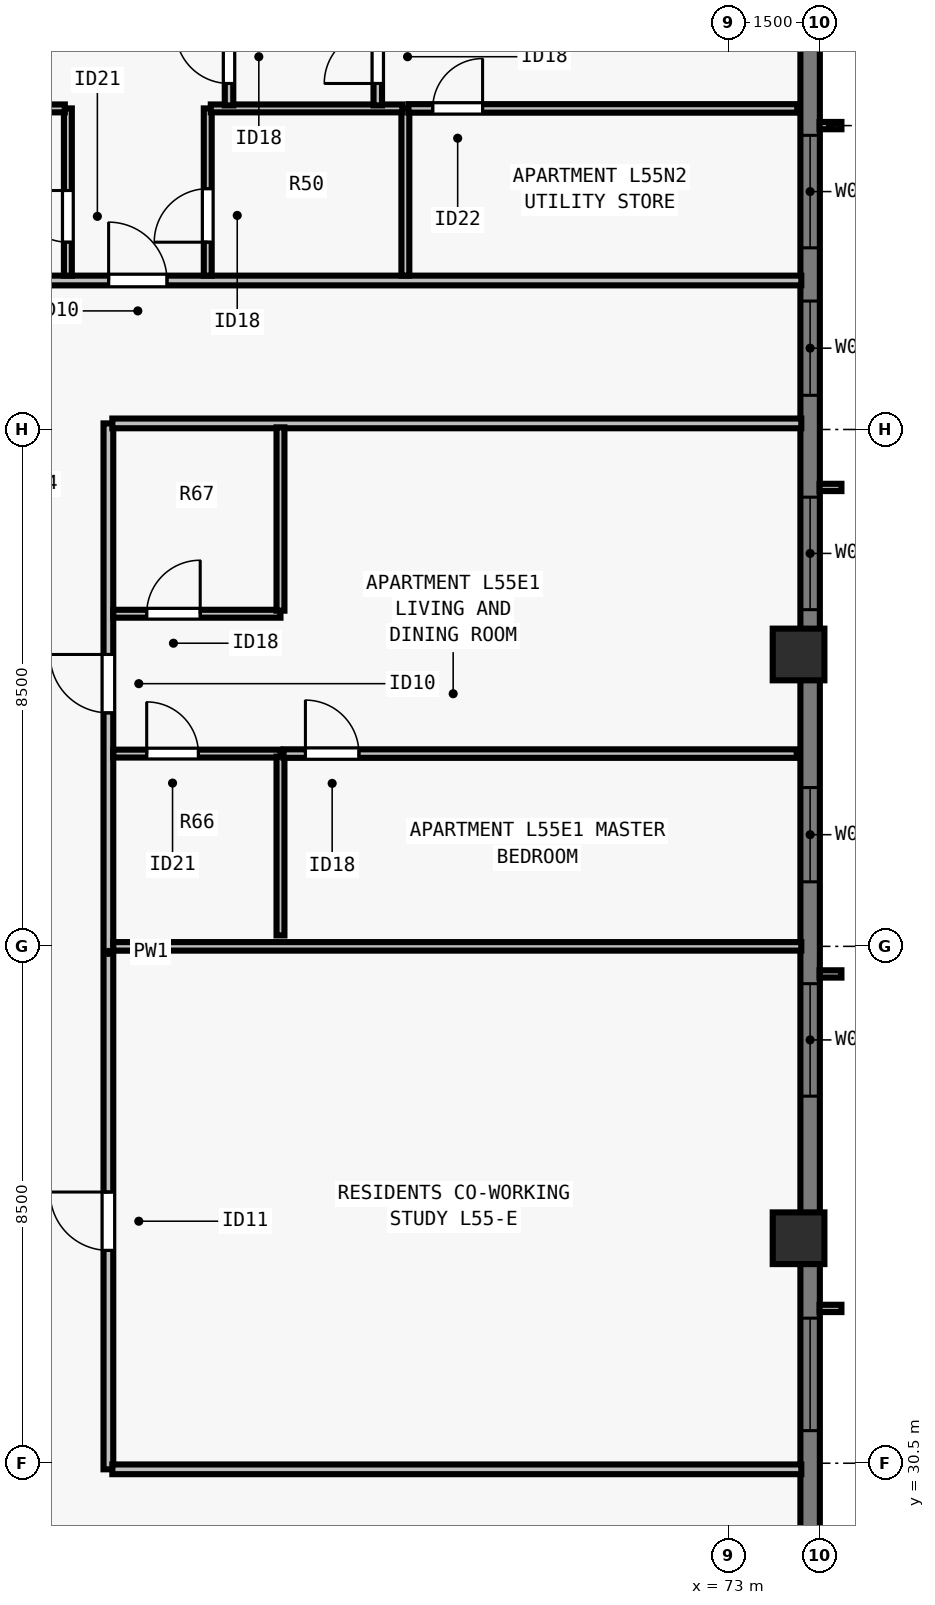
"""IFC4 building model, lengths in metres.
Left out: names, types, materials, properties, quantities, classifications, styles, units other than length and angle.
Written with IfcOpenShell. Run it as: python <this file> out.ifc"""

import sys

from ifc_helpers import new_model, si_unit, direction, frame, frame_2d, origin, origin_2d, place, context, subcontext, project, spatial, rectangle, extrude, element, fill, save


model = new_model("IFC4")
c1 = context("Model", 3, precision=1e-05, world=origin(), true_north=direction((0.0, 1.0)))
c2 = subcontext(c1, "Body", "Model", "MODEL_VIEW")
j1 = project(units=[si_unit("LENGTHUNIT", "METRE"), si_unit("PLANEANGLEUNIT", "RADIAN")], contexts=[c1])
p1 = place(None, origin())
s1 = spatial("IfcSite", under=j1, at=p1, CompositionType="ELEMENT")
p2 = place(p1, origin())
s2 = spatial("IfcBuilding", under=s1, at=p2, CompositionType="ELEMENT")
p3 = place(p2, frame((0.0, 0.0, 202.5)))
s3 = spatial("IfcBuildingStorey", under=s2, at=p3, CompositionType="ELEMENT", Elevation=202.5)
for number, where, z_axis, x_axis in (
    (1, (74.15, 34.2, 0.0), (0.0, 0.0, 1.0), (0.0, 1.0, 0.0)),
    (2, (74.15, 43.8, 0.0), (0.0, 0.0, 1.0), (0.0, 1.0, 0.0)),
):
    element("IfcColumn", number, at=place(p3, frame(where, z_axis=z_axis, x_axis=x_axis)), inside=s3, PredefinedType="COLUMN", context=c2, shape_type="SweptSolid", body=[
        extrude(rectangle(XDim=0.85, YDim=0.85, at=origin_2d()), origin(), (0.0, 0.0, 1.0), 3.5),
    ])
p4 = place(p3, frame((74.34, 56.5, 0.0), z_axis=(0.0, 0.0, 1.0), x_axis=(0.0, -1.0, 0.0)))
e3 = element("IfcWall", 3, at=p4, inside=s3, PredefinedType="SOLIDWALL", context=c2, shape_type="SweptSolid", body=[
    extrude(rectangle(XDim=34.702, YDim=0.32, at=frame_2d((17.351, 0.0))), origin(), (0.0, 0.0, 1.0), 3.29),
])
p5 = place(p4, frame((4.163, 0.0, 0.8)))
e4 = element("IfcOpeningElement", 4, at=p5, cuts=e3, PredefinedType="OPENING", context=c2, shape_type="SweptSolid", body=[
    extrude(rectangle(XDim=1.85, YDim=1.678, at=frame_2d((0.925, 0.839))), frame((0.0, 0.17, 0.0), z_axis=(0.0, -1.0, 0.0), x_axis=(1.0, 0.0, 0.0)), (0.0, 0.0, 1.0), 0.34),
])
p6 = place(p4, frame((6.888, 0.0, 0.8)))
e5 = element("IfcOpeningElement", 5, at=p6, cuts=e3, PredefinedType="OPENING", context=c2, shape_type="SweptSolid", body=[
    extrude(rectangle(XDim=1.55, YDim=1.678, at=frame_2d((0.775, 0.839))), frame((0.0, 0.17, 0.0), z_axis=(0.0, -1.0, 0.0), x_axis=(1.0, 0.0, 0.0)), (0.0, 0.0, 1.0), 0.34),
])
p7 = place(p4, frame((10.113, 0.0, 0.8)))
e6 = element("IfcOpeningElement", 6, at=p7, cuts=e3, PredefinedType="OPENING", context=c2, shape_type="SweptSolid", body=[
    extrude(rectangle(XDim=1.85, YDim=1.678, at=frame_2d((0.925, 0.839))), frame((0.0, 0.17, 0.0), z_axis=(0.0, -1.0, 0.0), x_axis=(1.0, 0.0, 0.0)), (0.0, 0.0, 1.0), 0.34),
])
p8 = place(p4, frame((14.888, 0.0, 0.8)))
e7 = element("IfcOpeningElement", 7, at=p8, cuts=e3, PredefinedType="OPENING", context=c2, shape_type="SweptSolid", body=[
    extrude(rectangle(XDim=1.55, YDim=1.678, at=frame_2d((0.775, 0.839))), frame((0.0, 0.17, 0.0), z_axis=(0.0, -1.0, 0.0), x_axis=(1.0, 0.0, 0.0)), (0.0, 0.0, 1.0), 0.34),
])
p9 = place(p4, frame((18.114, 0.0, 0.8)))
e8 = element("IfcOpeningElement", 8, at=p9, cuts=e3, PredefinedType="OPENING", context=c2, shape_type="SweptSolid", body=[
    extrude(rectangle(XDim=1.85, YDim=1.678, at=frame_2d((0.925, 0.839))), frame((0.0, 0.17, 0.0), z_axis=(0.0, -1.0, 0.0), x_axis=(1.0, 0.0, 0.0)), (0.0, 0.0, 1.0), 0.34),
])
p10 = place(p4, frame((23.614, 0.0, 0.8)))
e9 = element("IfcOpeningElement", 9, at=p10, cuts=e3, PredefinedType="OPENING", context=c2, shape_type="SweptSolid", body=[
    extrude(rectangle(XDim=1.85, YDim=1.678, at=frame_2d((0.925, 0.839))), frame((0.0, 0.17, 0.0), z_axis=(0.0, -1.0, 0.0), x_axis=(1.0, 0.0, 0.0)), (0.0, 0.0, 1.0), 0.34),
])
p11 = place(p4, frame((28.839, 0.0, 0.8)))
e10 = element("IfcOpeningElement", 10, at=p11, cuts=e3, PredefinedType="OPENING", context=c2, shape_type="SweptSolid", body=[
    extrude(rectangle(XDim=1.55, YDim=1.678, at=frame_2d((0.775, 0.839))), frame((0.0, 0.17, 0.0), z_axis=(0.0, -1.0, 0.0), x_axis=(1.0, 0.0, 0.0)), (0.0, 0.0, 1.0), 0.34),
])
p12 = place(p3, frame((29.805, 49.95, 0.0), z_axis=(0.0, 0.0, 1.0), x_axis=(1.0, 0.0, 0.0)))
e11 = element("IfcWall", 11, at=p12, inside=s3, PredefinedType="PARTITIONING", context=c2, shape_type="SweptSolid", body=[
    extrude(rectangle(XDim=44.39, YDim=0.16, at=frame_2d((22.195, 0.0))), origin(), (0.0, 0.0, 1.0), 2.958),
])
p13 = place(p12, frame((10.919, 0.0, 0.0)))
e12 = element("IfcOpeningElement", 12, at=p13, cuts=e11, PredefinedType="OPENING", context=c2, shape_type="SweptSolid", body=[
    extrude(rectangle(XDim=0.96, YDim=2.18, at=frame_2d((0.48, 1.09))), frame((0.0, 0.09, 0.0), z_axis=(0.0, -1.0, 0.0), x_axis=(1.0, 0.0, 0.0)), (0.0, 0.0, 1.0), 0.18),
])
p14 = place(p12, frame((32.999, 0.0, 0.0)))
e13 = element("IfcOpeningElement", 13, at=p14, cuts=e11, PredefinedType="OPENING", context=c2, shape_type="SweptSolid", body=[
    extrude(rectangle(XDim=0.96, YDim=2.18, at=frame_2d((0.48, 1.09))), frame((0.0, 0.09, 0.0), z_axis=(0.0, -1.0, 0.0), x_axis=(1.0, 0.0, 0.0)), (0.0, 0.0, 1.0), 0.18),
])
p15 = place(p3, frame((62.8, 30.4, 0.0), z_axis=(0.0, 0.0, 1.0), x_axis=(0.0, 1.0, 0.0)))
e14 = element("IfcWall", 14, at=p15, inside=s3, PredefinedType="PARTITIONING", context=c2, shape_type="SweptSolid", body=[
    extrude(rectangle(XDim=17.2, YDim=0.16, at=frame_2d((8.6, 0.0))), origin(), (0.0, 0.0, 1.0), 3.29),
])
p16 = place(p15, frame((3.6, 0.0, 0.0)))
e15 = element("IfcOpeningElement", 15, at=p16, cuts=e14, PredefinedType="OPENING", context=c2, shape_type="SweptSolid", body=[
    extrude(rectangle(XDim=0.96, YDim=2.12, at=frame_2d((0.48, 1.06))), frame((0.0, 0.09, 0.0), z_axis=(0.0, -1.0, 0.0), x_axis=(1.0, 0.0, 0.0)), (0.0, 0.0, 1.0), 0.18),
])
p17 = place(p15, frame((12.44, 0.0, 0.0)))
e16 = element("IfcOpeningElement", 16, at=p17, cuts=e14, PredefinedType="OPENING", context=c2, shape_type="SweptSolid", body=[
    extrude(rectangle(XDim=0.96, YDim=2.18, at=frame_2d((0.48, 1.09))), frame((0.0, 0.09, 0.0), z_axis=(0.0, -1.0, 0.0), x_axis=(1.0, 0.0, 0.0)), (0.0, 0.0, 1.0), 0.18),
])
for number, where, z_axis, x_axis in (
    (17, (62.865, 30.4, 0.0), (0.0, 0.0, 1.0), (1.0, 0.0, 0.0)),
    (18, (62.865, 47.6, 0.0), (0.0, 0.0, 1.0), (1.0, 0.0, 0.0)),
):
    element("IfcWall", number, at=place(p3, frame(where, z_axis=z_axis, x_axis=x_axis)), inside=s3, PredefinedType="PARTITIONING", context=c2, shape_type="SweptSolid", body=[
        extrude(rectangle(XDim=11.33, YDim=0.16, at=frame_2d((5.665, 0.0))), origin(), (0.0, 0.0, 1.0), 3.29),
    ])
p18 = place(p3, frame((62.134, 50.03, 0.0), z_axis=(0.0, 0.0, 1.0), x_axis=(0.0, 1.0, 0.0)))
e19 = element("IfcWall", 19, at=p18, inside=s3, PredefinedType="PLUMBINGWALL", context=c2, shape_type="SweptSolid", body=[
    extrude(rectangle(XDim=2.75, YDim=0.13, at=frame_2d((1.375, 0.0))), origin(), (0.0, 0.0, 1.0), 2.573),
])
p19 = place(p18, frame((0.55, 0.0, 0.0)))
e20 = element("IfcOpeningElement", 20, at=p19, cuts=e19, PredefinedType="OPENING", context=c2, shape_type="SweptSolid", body=[
    extrude(rectangle(XDim=0.85, YDim=2.08, at=frame_2d((0.425, 1.04))), frame((0.0, 0.075, 0.0), z_axis=(0.0, -1.0, 0.0), x_axis=(1.0, 0.0, 0.0)), (0.0, 0.0, 1.0), 0.15),
])
p20 = place(p3, frame((59.234, 52.78, 0.0), z_axis=(0.0, 0.0, 1.0), x_axis=(1.0, 0.0, 0.0)))
e21 = element("IfcWall", 21, at=p20, inside=s3, PredefinedType="PLUMBINGWALL", context=c2, shape_type="SweptSolid", body=[
    extrude(rectangle(XDim=2.85, YDim=0.13, at=frame_2d((1.425, 0.0))), origin(), (0.0, 0.0, 1.0), 3.29),
])
p21 = place(p3, frame((67.684, 50.03, 0.0), z_axis=(0.0, 0.0, 1.0), x_axis=(0.0, 1.0, 0.0)))
e22 = element("IfcWall", 22, at=p21, inside=s3, PredefinedType="PLUMBINGWALL", context=c2, shape_type="SweptSolid", body=[
    extrude(rectangle(XDim=2.75, YDim=0.13, at=frame_2d((1.375, 0.0))), origin(), (0.0, 0.0, 1.0), 3.29),
])
p22 = place(p3, frame((64.434, 50.03, 0.0), z_axis=(0.0, 0.0, 1.0), x_axis=(0.0, 1.0, 0.0)))
e23 = element("IfcWall", 23, at=p22, inside=s3, PredefinedType="PLUMBINGWALL", context=c2, shape_type="SweptSolid", body=[
    extrude(rectangle(XDim=2.75, YDim=0.13, at=frame_2d((1.375, 0.0))), origin(), (0.0, 0.0, 1.0), 3.29),
])
p23 = place(p22, frame((0.55, 0.0, 0.0)))
e24 = element("IfcOpeningElement", 24, at=p23, cuts=e23, PredefinedType="OPENING", context=c2, shape_type="SweptSolid", body=[
    extrude(rectangle(XDim=0.88, YDim=2.1, at=frame_2d((0.44, 1.05))), frame((0.0, 0.075, 0.0), z_axis=(0.0, -1.0, 0.0), x_axis=(1.0, 0.0, 0.0)), (0.0, 0.0, 1.0), 0.15),
])
p24 = place(p3, frame((64.484, 52.78, 0.0), z_axis=(0.0, 0.0, 1.0), x_axis=(1.0, 0.0, 0.0)))
e25 = element("IfcWall", 25, at=p24, inside=s3, PredefinedType="PLUMBINGWALL", context=c2, shape_type="SweptSolid", body=[
    extrude(rectangle(XDim=3.15, YDim=0.13, at=frame_2d((1.575, 0.0))), origin(), (0.0, 0.0, 1.0), 3.29),
])
p25 = place(p3, frame((67.23, 52.83, 0.0), z_axis=(0.0, 0.0, 1.0), x_axis=(0.0, 1.0, 0.0)))
e26 = element("IfcWall", 26, at=p25, inside=s3, PredefinedType="PARTITIONING", context=c2, shape_type="SweptSolid", body=[
    extrude(rectangle(XDim=8.29, YDim=0.14, at=frame_2d((4.145, 0.0))), origin(), (0.0, 0.0, 1.0), 2.573),
])
p26 = place(p25, frame((0.36, 0.0, 0.0)))
e27 = element("IfcOpeningElement", 27, at=p26, cuts=e26, PredefinedType="OPENING", context=c2, shape_type="SweptSolid", body=[
    extrude(rectangle(XDim=0.88, YDim=2.1, at=frame_2d((0.44, 1.05))), frame((0.0, 0.08, 0.0), z_axis=(0.0, -1.0, 0.0), x_axis=(1.0, 0.0, 0.0)), (0.0, 0.0, 1.0), 0.16),
])
p27 = place(p3, frame((67.734, 52.78, 0.0), z_axis=(0.0, 0.0, 1.0), x_axis=(1.0, 0.0, 0.0)))
e28 = element("IfcWall", 28, at=p27, inside=s3, PredefinedType="PARTITIONING", context=c2, shape_type="SweptSolid", body=[
    extrude(rectangle(XDim=6.396, YDim=0.14, at=frame_2d((3.198, 0.0))), origin(), (0.0, 0.0, 1.0), 2.958),
])
p28 = place(p27, frame((0.4, 0.0, 0.0)))
e29 = element("IfcOpeningElement", 29, at=p28, cuts=e28, PredefinedType="OPENING", context=c2, shape_type="SweptSolid", body=[
    extrude(rectangle(XDim=0.82, YDim=2.1, at=frame_2d((0.41, 1.05))), frame((0.0, 0.08, 0.0), z_axis=(0.0, -1.0, 0.0), x_axis=(1.0, 0.0, 0.0)), (0.0, 0.0, 1.0), 0.16),
])
p29 = place(p3, frame((64.784, 52.83, 0.0), z_axis=(0.0, 0.0, 1.0), x_axis=(0.0, 1.0, 0.0)))
e30 = element("IfcWall", 30, at=p29, inside=s3, PredefinedType="PARTITIONING", context=c2, shape_type="SweptSolid", body=[
    extrude(rectangle(XDim=8.29, YDim=0.14, at=frame_2d((4.145, 0.0))), origin(), (0.0, 0.0, 1.0), 2.573),
])
p30 = place(p29, frame((0.36, 0.0, 0.0)))
e31 = element("IfcOpeningElement", 31, at=p30, cuts=e30, PredefinedType="OPENING", context=c2, shape_type="SweptSolid", body=[
    extrude(rectangle(XDim=0.88, YDim=2.1, at=frame_2d((0.44, 1.05))), frame((0.0, 0.08, 0.0), z_axis=(0.0, -1.0, 0.0), x_axis=(1.0, 0.0, 0.0)), (0.0, 0.0, 1.0), 0.16),
])
p31 = place(p3, frame((62.88, 39.0, 0.0), z_axis=(0.0, 0.0, 1.0), x_axis=(1.0, 0.0, 0.0)))
e32 = element("IfcWall", 32, at=p31, inside=s3, PredefinedType="PARTITIONING", context=c2, shape_type="SweptSolid", body=[
    extrude(rectangle(XDim=11.315, YDim=0.14, at=frame_2d((5.658, 0.0))), origin(), (0.0, 0.0, 1.0), 3.29),
])
p32 = place(p3, frame((62.88, 42.17, 0.0), z_axis=(0.0, 0.0, 1.0), x_axis=(1.0, 0.0, 0.0)))
e33 = element("IfcWall", 33, at=p32, inside=s3, PredefinedType="PLUMBINGWALL", context=c2, shape_type="SweptSolid", body=[
    extrude(rectangle(XDim=2.75, YDim=0.13, at=frame_2d((1.375, 0.0))), origin(), (0.0, 0.0, 1.0), 3.29),
])
p33 = place(p32, frame((0.55, 0.0, 0.0)))
e34 = element("IfcOpeningElement", 34, at=p33, cuts=e33, PredefinedType="OPENING", context=c2, shape_type="SweptSolid", body=[
    extrude(rectangle(XDim=0.85, YDim=2.08, at=frame_2d((0.425, 1.04))), frame((0.0, 0.075, 0.0), z_axis=(0.0, -1.0, 0.0), x_axis=(1.0, 0.0, 0.0)), (0.0, 0.0, 1.0), 0.15),
])
p34 = place(p3, frame((65.63, 39.18, 0.0), z_axis=(0.0, 0.0, 1.0), x_axis=(0.0, 1.0, 0.0)))
e35 = element("IfcWall", 35, at=p34, inside=s3, PredefinedType="PLUMBINGWALL", context=c2, shape_type="SweptSolid", body=[
    extrude(rectangle(XDim=2.94, YDim=0.13, at=frame_2d((1.47, 0.0))), origin(), (0.0, 0.0, 1.0), 3.29),
])
p35 = place(p3, frame((62.88, 44.47, 0.0), z_axis=(0.0, 0.0, 1.0), x_axis=(1.0, 0.0, 0.0)))
e36 = element("IfcWall", 36, at=p35, inside=s3, PredefinedType="PLUMBINGWALL", context=c2, shape_type="SweptSolid", body=[
    extrude(rectangle(XDim=2.75, YDim=0.13, at=frame_2d((1.375, 0.0))), origin(), (0.0, 0.0, 1.0), 3.29),
])
p36 = place(p35, frame((0.55, 0.0, 0.0)))
e37 = element("IfcOpeningElement", 37, at=p36, cuts=e36, PredefinedType="OPENING", context=c2, shape_type="SweptSolid", body=[
    extrude(rectangle(XDim=0.88, YDim=2.1, at=frame_2d((0.44, 1.05))), frame((0.0, 0.075, 0.0), z_axis=(0.0, -1.0, 0.0), x_axis=(1.0, 0.0, 0.0)), (0.0, 0.0, 1.0), 0.15),
])
p37 = place(p3, frame((65.63, 44.52, 0.0), z_axis=(0.0, 0.0, 1.0), x_axis=(0.0, 1.0, 0.0)))
e38 = element("IfcWall", 38, at=p37, inside=s3, PredefinedType="PLUMBINGWALL", context=c2, shape_type="SweptSolid", body=[
    extrude(rectangle(XDim=3.015, YDim=0.13, at=frame_2d((1.507, 0.0))), origin(), (0.0, 0.0, 1.0), 3.29),
])
p38 = place(p3, frame((65.68, 42.17, 0.0), z_axis=(0.0, 0.0, 1.0), x_axis=(1.0, 0.0, 0.0)))
e39 = element("IfcWall", 39, at=p38, inside=s3, PredefinedType="PARTITIONING", context=c2, shape_type="SweptSolid", body=[
    extrude(rectangle(XDim=8.44, YDim=0.14, at=frame_2d((4.22, 0.0))), origin(), (0.0, 0.0, 1.0), 3.29),
])
p39 = place(p38, frame((0.36, 0.0, 0.0)))
e40 = element("IfcOpeningElement", 40, at=p39, cuts=e39, PredefinedType="OPENING", context=c2, shape_type="SweptSolid", body=[
    extrude(rectangle(XDim=0.88, YDim=2.1, at=frame_2d((0.44, 1.05))), frame((0.0, 0.08, 0.0), z_axis=(0.0, -1.0, 0.0), x_axis=(1.0, 0.0, 0.0)), (0.0, 0.0, 1.0), 0.16),
])
p40 = place(p5, origin())
e41 = element("IfcWindow", 41, at=p40, inside=s3, PartitioningType="SINGLE_PANEL", PredefinedType="WINDOW", context=c2, shape_type="SweptSolid", body=[
    extrude(rectangle(XDim=1.85, YDim=1.678, at=frame_2d((0.925, 0.839))), frame((0.0, -0.05, 0.0), z_axis=(0.0, -1.0, 0.0), x_axis=(1.0, 0.0, 0.0)), (0.0, 0.0, 1.0), 0.06),
])
fill(e4, e41)
p41 = place(p6, origin())
e42 = element("IfcWindow", 42, at=p41, inside=s3, PartitioningType="SINGLE_PANEL", PredefinedType="WINDOW", context=c2, shape_type="SweptSolid", body=[
    extrude(rectangle(XDim=1.55, YDim=1.678, at=frame_2d((0.775, 0.839))), frame((0.0, -0.05, 0.0), z_axis=(0.0, -1.0, 0.0), x_axis=(1.0, 0.0, 0.0)), (0.0, 0.0, 1.0), 0.06),
])
fill(e5, e42)
p42 = place(p7, origin())
e43 = element("IfcWindow", 43, at=p42, inside=s3, PartitioningType="SINGLE_PANEL", PredefinedType="WINDOW", context=c2, shape_type="SweptSolid", body=[
    extrude(rectangle(XDim=1.85, YDim=1.678, at=frame_2d((0.925, 0.839))), frame((0.0, -0.05, 0.0), z_axis=(0.0, -1.0, 0.0), x_axis=(1.0, 0.0, 0.0)), (0.0, 0.0, 1.0), 0.06),
])
fill(e6, e43)
p43 = place(p8, origin())
e44 = element("IfcWindow", 44, at=p43, inside=s3, PartitioningType="SINGLE_PANEL", PredefinedType="WINDOW", context=c2, shape_type="SweptSolid", body=[
    extrude(rectangle(XDim=1.55, YDim=1.678, at=frame_2d((0.775, 0.839))), frame((0.0, -0.05, 0.0), z_axis=(0.0, -1.0, 0.0), x_axis=(1.0, 0.0, 0.0)), (0.0, 0.0, 1.0), 0.06),
])
fill(e7, e44)
p44 = place(p9, origin())
e45 = element("IfcWindow", 45, at=p44, inside=s3, PartitioningType="SINGLE_PANEL", PredefinedType="WINDOW", context=c2, shape_type="SweptSolid", body=[
    extrude(rectangle(XDim=1.85, YDim=1.678, at=frame_2d((0.925, 0.839))), frame((0.0, -0.05, 0.0), z_axis=(0.0, -1.0, 0.0), x_axis=(1.0, 0.0, 0.0)), (0.0, 0.0, 1.0), 0.06),
])
fill(e8, e45)
p45 = place(p10, origin())
e46 = element("IfcWindow", 46, at=p45, inside=s3, PartitioningType="SINGLE_PANEL", PredefinedType="WINDOW", context=c2, shape_type="SweptSolid", body=[
    extrude(rectangle(XDim=1.85, YDim=1.678, at=frame_2d((0.925, 0.839))), frame((0.0, -0.05, 0.0), z_axis=(0.0, -1.0, 0.0), x_axis=(1.0, 0.0, 0.0)), (0.0, 0.0, 1.0), 0.06),
])
fill(e9, e46)
p46 = place(p19, origin())
e47 = element("IfcDoor", 47, at=p46, inside=s3, OperationType="SINGLE_SWING_RIGHT", PredefinedType="DOOR", context=c2, shape_type="SweptSolid", body=[
    extrude(rectangle(XDim=0.85, YDim=2.08, at=frame_2d((0.425, 1.04))), frame((0.0, 0.025, 0.0), z_axis=(0.0, -1.0, 0.0), x_axis=(1.0, 0.0, 0.0)), (0.0, 0.0, 1.0), 0.05),
])
fill(e20, e47)
p47 = place(p23, origin())
e48 = element("IfcDoor", 48, at=p47, inside=s3, OperationType="SINGLE_SWING_LEFT", PredefinedType="DOOR", context=c2, shape_type="SweptSolid", body=[
    extrude(rectangle(XDim=0.88, YDim=2.1, at=frame_2d((0.44, 1.05))), frame((0.0, 0.025, 0.0), z_axis=(0.0, -1.0, 0.0), x_axis=(1.0, 0.0, 0.0)), (0.0, 0.0, 1.0), 0.05),
])
fill(e24, e48)
p48 = place(p28, origin())
e49 = element("IfcDoor", 49, at=p48, inside=s3, OperationType="SINGLE_SWING_RIGHT", PredefinedType="DOOR", context=c2, shape_type="SweptSolid", body=[
    extrude(rectangle(XDim=0.82, YDim=2.1, at=frame_2d((0.41, 1.05))), frame((0.0, 0.025, 0.0), z_axis=(0.0, -1.0, 0.0), x_axis=(1.0, 0.0, 0.0)), (0.0, 0.0, 1.0), 0.05),
])
fill(e29, e49)
p49 = place(p26, origin())
e50 = element("IfcDoor", 50, at=p49, inside=s3, OperationType="SINGLE_SWING_LEFT", PredefinedType="DOOR", context=c2, shape_type="SweptSolid", body=[
    extrude(rectangle(XDim=0.88, YDim=2.1, at=frame_2d((0.44, 1.05))), frame((0.0, 0.025, 0.0), z_axis=(0.0, -1.0, 0.0), x_axis=(1.0, 0.0, 0.0)), (0.0, 0.0, 1.0), 0.05),
])
fill(e27, e50)
p50 = place(p30, origin())
e51 = element("IfcDoor", 51, at=p50, inside=s3, OperationType="SINGLE_SWING_RIGHT", PredefinedType="DOOR", context=c2, shape_type="SweptSolid", body=[
    extrude(rectangle(XDim=0.88, YDim=2.1, at=frame_2d((0.44, 1.05))), frame((0.0, 0.025, 0.0), z_axis=(0.0, -1.0, 0.0), x_axis=(1.0, 0.0, 0.0)), (0.0, 0.0, 1.0), 0.05),
])
fill(e31, e51)
p51 = place(p14, origin())
e52 = element("IfcDoor", 52, at=p51, inside=s3, OperationType="SINGLE_SWING_LEFT", PredefinedType="DOOR", context=c2, shape_type="SweptSolid", body=[
    extrude(rectangle(XDim=0.96, YDim=2.18, at=frame_2d((0.48, 1.09))), frame((0.0, 0.025, 0.0), z_axis=(0.0, -1.0, 0.0), x_axis=(1.0, 0.0, 0.0)), (0.0, 0.0, 1.0), 0.05),
])
fill(e13, e52)
p52 = place(p16, origin())
e53 = element("IfcDoor", 53, at=p52, inside=s3, OperationType="SINGLE_SWING_RIGHT", PredefinedType="DOOR", context=c2, shape_type="SweptSolid", body=[
    extrude(rectangle(XDim=0.96, YDim=2.12, at=frame_2d((0.48, 1.06))), frame((0.0, 0.025, 0.0), z_axis=(0.0, -1.0, 0.0), x_axis=(1.0, 0.0, 0.0)), (0.0, 0.0, 1.0), 0.05),
])
fill(e15, e53)
p53 = place(p33, origin())
e54 = element("IfcDoor", 54, at=p53, inside=s3, OperationType="SINGLE_SWING_LEFT", PredefinedType="DOOR", context=c2, shape_type="SweptSolid", body=[
    extrude(rectangle(XDim=0.85, YDim=2.08, at=frame_2d((0.425, 1.04))), frame((0.0, 0.025, 0.0), z_axis=(0.0, -1.0, 0.0), x_axis=(1.0, 0.0, 0.0)), (0.0, 0.0, 1.0), 0.05),
])
fill(e34, e54)
p54 = place(p36, origin())
e55 = element("IfcDoor", 55, at=p54, inside=s3, OperationType="SINGLE_SWING_RIGHT", PredefinedType="DOOR", context=c2, shape_type="SweptSolid", body=[
    extrude(rectangle(XDim=0.88, YDim=2.1, at=frame_2d((0.44, 1.05))), frame((0.0, 0.025, 0.0), z_axis=(0.0, -1.0, 0.0), x_axis=(1.0, 0.0, 0.0)), (0.0, 0.0, 1.0), 0.05),
])
fill(e37, e55)
p55 = place(p39, origin())
e56 = element("IfcDoor", 56, at=p55, inside=s3, OperationType="SINGLE_SWING_LEFT", PredefinedType="DOOR", context=c2, shape_type="SweptSolid", body=[
    extrude(rectangle(XDim=0.88, YDim=2.1, at=frame_2d((0.44, 1.05))), frame((0.0, 0.025, 0.0), z_axis=(0.0, -1.0, 0.0), x_axis=(1.0, 0.0, 0.0)), (0.0, 0.0, 1.0), 0.05),
])
fill(e40, e56)
p56 = place(p17, origin())
e57 = element("IfcDoor", 57, at=p56, inside=s3, OperationType="SINGLE_SWING_RIGHT", PredefinedType="DOOR", context=c2, shape_type="SweptSolid", body=[
    extrude(rectangle(XDim=0.96, YDim=2.18, at=frame_2d((0.48, 1.09))), frame((0.0, 0.025, 0.0), z_axis=(0.0, -1.0, 0.0), x_axis=(1.0, 0.0, 0.0)), (0.0, 0.0, 1.0), 0.05),
])
fill(e16, e57)
save(model, sys.argv[1])
